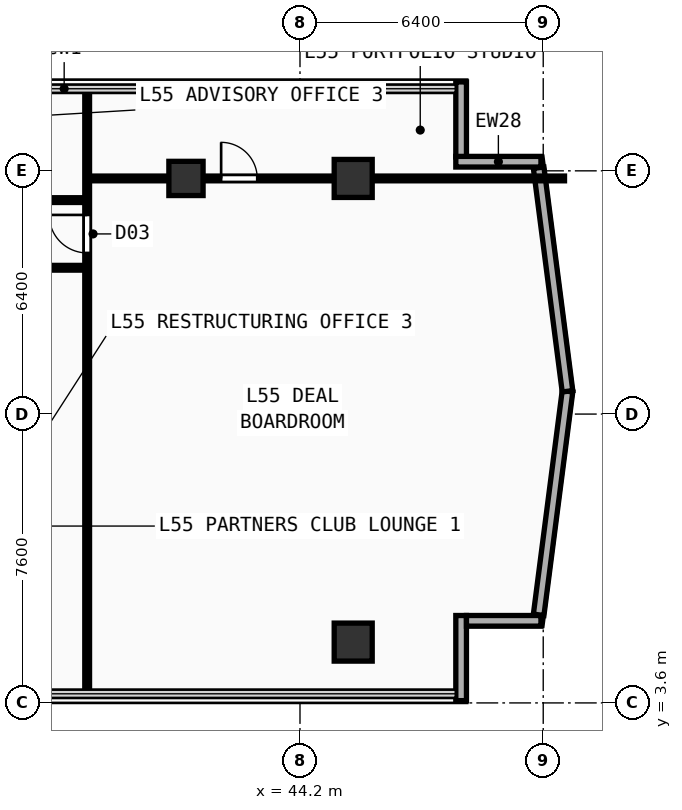
"""IFC4 building model, lengths in metres.
Left out: names, types, materials, properties, quantities, classifications, styles, units other than length and angle.
Written with IfcOpenShell. Run it as: python <this file> out.ifc"""

import sys

from ifc_helpers import new_model, si_unit, direction, frame, frame_2d, origin, origin_2d, place, context, subcontext, project, spatial, rectangle, extrude, element, fill, save


model = new_model("IFC4")
c1 = context("Model", 3, precision=1e-05, world=origin(), true_north=direction((0.0, 1.0)))
c2 = subcontext(c1, "Body", "Model", "MODEL_VIEW")
j1 = project(units=[si_unit("LENGTHUNIT", "METRE"), si_unit("PLANEANGLEUNIT", "RADIAN")], contexts=[c1])
p1 = place(None, origin())
s1 = spatial("IfcSite", under=j1, at=p1, CompositionType="ELEMENT")
p2 = place(p1, origin())
s2 = spatial("IfcBuilding", under=s1, at=p2, CompositionType="ELEMENT")
p3 = place(p2, frame((0.0, 0.0, 215.9)))
s3 = spatial("IfcBuildingStorey", under=s2, at=p3, CompositionType="ELEMENT", Elevation=215.9)
for number, where, z_axis, x_axis in (
    (1, (45.6, 5.2, 0.0), (0.0, 0.0, 1.0), (1.0, 0.0, 0.0)),
    (2, (45.6, 17.4, 0.0), (0.0, 0.0, 1.0), (1.0, 0.0, 0.0)),
):
    element("IfcColumn", number, at=place(p3, frame(where, z_axis=z_axis, x_axis=x_axis)), inside=s3, PredefinedType="COLUMN", context=c2, shape_type="SweptSolid", body=[
        extrude(rectangle(XDim=1.0, YDim=1.0, at=origin_2d()), origin(), (0.0, 0.0, 1.0), 3.56),
    ])
p4 = place(p3, frame((41.2, 17.4, 0.0), z_axis=(0.0, 0.0, 1.0), x_axis=(1.0, 0.0, 0.0)))
e3 = element("IfcColumn", 3, at=p4, inside=s3, PredefinedType="COLUMN", context=c2, shape_type="SweptSolid", body=[
    extrude(rectangle(XDim=0.9, YDim=0.9, at=origin_2d()), origin(), (0.0, 0.0, 1.0), 3.56),
])
p5 = place(p3, frame((48.44, 3.66, 0.0), z_axis=(0.0, 0.0, 1.0), x_axis=(0.0, 1.0, 0.0)))
e4 = element("IfcWall", 4, at=p5, inside=s3, PredefinedType="SOLIDWALL", context=c2, shape_type="SweptSolid", body=[
    extrude(rectangle(XDim=2.24, YDim=0.28, at=frame_2d((1.12, 0.0))), origin(), (0.0, 0.0, 1.0), 3.56),
])
p6 = place(p3, frame((48.58, 5.76, 0.0), z_axis=(0.0, 0.0, 1.0), x_axis=(1.0, 0.0, 0.0)))
e5 = element("IfcWall", 5, at=p6, inside=s3, PredefinedType="SOLIDWALL", context=c2, shape_type="SweptSolid", body=[
    extrude(rectangle(XDim=1.96, YDim=0.28, at=frame_2d((0.98, 0.0))), origin(), (0.0, 0.0, 1.0), 3.56),
])
p7 = place(p3, frame((48.44, 17.965, 0.0), z_axis=(0.0, 0.0, 1.0), x_axis=(0.0, 1.0, 0.0)))
e6 = element("IfcWall", 6, at=p7, inside=s3, PredefinedType="SOLIDWALL", context=c2, shape_type="SweptSolid", body=[
    extrude(rectangle(XDim=1.975, YDim=0.28, at=frame_2d((0.987, 0.0))), origin(), (0.0, 0.0, 1.0), 3.56),
])
p8 = place(p3, frame((48.3, 17.84, 0.0), z_axis=(0.0, 0.0, 1.0), x_axis=(1.0, 0.0, 0.0)))
e7 = element("IfcWall", 7, at=p8, inside=s3, PredefinedType="SOLIDWALL", context=c2, shape_type="SweptSolid", body=[
    extrude(rectangle(XDim=2.24, YDim=0.28, at=frame_2d((1.12, 0.0))), origin(), (0.0, 0.0, 1.0), 3.56),
])
for number, where, z_axis, x_axis in (
    (8, (50.48, 5.918, 0.0), (0.0, 0.0, 1.0), (0.128, 0.992, 0.0)),
    (9, (51.239, 11.799, 0.0), (0.0, 0.0, 1.0), (-0.128, 0.992, 0.0)),
):
    element("IfcWall", number, at=place(p3, frame(where, z_axis=z_axis, x_axis=x_axis)), inside=s3, PredefinedType="SOLIDWALL", context=c2, shape_type="SweptSolid", body=[
        extrude(rectangle(XDim=5.931, YDim=0.28, at=frame_2d((2.966, 0.0))), origin(), (0.0, 0.0, 1.0), 3.56),
    ])
p9 = place(p3, frame((23.7, 15.05, 0.0), z_axis=(0.0, 0.0, 1.0), x_axis=(1.0, 0.0, 0.0)))
e10 = element("IfcWall", 10, at=p9, inside=s3, PredefinedType="PARTITIONING", context=c2, shape_type="SweptSolid", body=[
    extrude(rectangle(XDim=14.9, YDim=0.125, at=frame_2d((7.45, 0.0))), origin(), (0.0, 0.0, 1.0), 3.56),
])
p10 = place(p9, frame((1.985, 0.0, 0.0)))
e11 = element("IfcOpeningElement", 11, at=p10, cuts=e10, PredefinedType="OPENING", context=c2, shape_type="SweptSolid", body=[
    extrude(rectangle(XDim=0.95, YDim=2.15, at=frame_2d((0.475, 1.075))), frame((0.0, 0.073, 0.0), z_axis=(0.0, -1.0, 0.0), x_axis=(1.0, 0.0, 0.0)), (0.0, 0.0, 1.0), 0.145),
])
p11 = place(p9, frame((6.903, 0.0, 0.0)))
e12 = element("IfcOpeningElement", 12, at=p11, cuts=e10, PredefinedType="OPENING", context=c2, shape_type="SweptSolid", body=[
    extrude(rectangle(XDim=0.95, YDim=2.15, at=frame_2d((0.475, 1.075))), frame((0.0, 0.073, 0.0), z_axis=(0.0, -1.0, 0.0), x_axis=(1.0, 0.0, 0.0)), (0.0, 0.0, 1.0), 0.145),
])
p12 = place(p9, frame((11.416, 0.0, 0.0)))
e13 = element("IfcOpeningElement", 13, at=p12, cuts=e10, PredefinedType="OPENING", context=c2, shape_type="SweptSolid", body=[
    extrude(rectangle(XDim=0.95, YDim=2.15, at=frame_2d((0.475, 1.075))), frame((0.0, 0.073, 0.0), z_axis=(0.0, -1.0, 0.0), x_axis=(1.0, 0.0, 0.0)), (0.0, 0.0, 1.0), 0.145),
])
p13 = place(p3, frame((38.6, 3.84, 0.0), z_axis=(0.0, 0.0, 1.0), x_axis=(0.0, 1.0, 0.0)))
e14 = element("IfcWall", 14, at=p13, inside=s3, PredefinedType="PARTITIONING", context=c2, shape_type="SweptSolid", body=[
    extrude(rectangle(XDim=15.92, YDim=0.125, at=frame_2d((7.96, 0.0))), origin(), (0.0, 0.0, 1.0), 3.56),
])
p14 = place(p13, frame((11.6, 0.0, 0.0)))
e15 = element("IfcOpeningElement", 15, at=p14, cuts=e14, PredefinedType="OPENING", context=c2, shape_type="SweptSolid", body=[
    extrude(rectangle(XDim=1.0, YDim=2.2, at=frame_2d((0.5, 1.1))), frame((0.0, 0.073, 0.0), z_axis=(0.0, -1.0, 0.0), x_axis=(1.0, 0.0, 0.0)), (0.0, 0.0, 1.0), 0.145),
])
p15 = place(p3, frame((38.6, 17.4, 0.0), z_axis=(0.0, 0.0, 1.0), x_axis=(1.0, 0.0, 0.0)))
e16 = element("IfcWall", 16, at=p15, inside=s3, PredefinedType="PARTITIONING", context=c2, shape_type="SweptSolid", body=[
    extrude(rectangle(XDim=12.56, YDim=0.125, at=frame_2d((6.28, 0.0))), origin(), (0.0, 0.0, 1.0), 3.26),
])
p16 = place(p15, frame((3.525, 0.0, 0.0)))
e17 = element("IfcOpeningElement", 17, at=p16, cuts=e16, PredefinedType="OPENING", context=c2, shape_type="SweptSolid", body=[
    extrude(rectangle(XDim=0.95, YDim=2.15, at=frame_2d((0.475, 1.075))), frame((0.0, 0.073, 0.0), z_axis=(0.0, -1.0, 0.0), x_axis=(1.0, 0.0, 0.0)), (0.0, 0.0, 1.0), 0.145),
])
p17 = place(p3, frame((23.65, 16.83, 0.0), z_axis=(0.0, 0.0, 1.0), x_axis=(1.0, 0.0, 0.0)))
e18 = element("IfcWall", 18, at=p17, inside=s3, PredefinedType="PARTITIONING", context=c2, shape_type="SweptSolid", body=[
    extrude(rectangle(XDim=14.95, YDim=0.125, at=frame_2d((7.475, 0.0))), origin(), (0.0, 0.0, 1.0), 3.56),
])
p18 = place(p17, frame((1.548, 0.0, 0.0)))
e19 = element("IfcOpeningElement", 19, at=p18, cuts=e18, PredefinedType="OPENING", context=c2, shape_type="SweptSolid", body=[
    extrude(rectangle(XDim=0.95, YDim=2.15, at=frame_2d((0.475, 1.075))), frame((0.0, 0.073, 0.0), z_axis=(0.0, -1.0, 0.0), x_axis=(1.0, 0.0, 0.0)), (0.0, 0.0, 1.0), 0.145),
])
p19 = place(p17, frame((6.333, 0.0, 0.0)))
e20 = element("IfcOpeningElement", 20, at=p19, cuts=e18, PredefinedType="OPENING", context=c2, shape_type="SweptSolid", body=[
    extrude(rectangle(XDim=0.95, YDim=2.15, at=frame_2d((0.475, 1.075))), frame((0.0, 0.073, 0.0), z_axis=(0.0, -1.0, 0.0), x_axis=(1.0, 0.0, 0.0)), (0.0, 0.0, 1.0), 0.145),
])
p20 = place(p17, frame((11.277, 0.0, 0.0)))
e21 = element("IfcOpeningElement", 21, at=p20, cuts=e18, PredefinedType="OPENING", context=c2, shape_type="SweptSolid", body=[
    extrude(rectangle(XDim=0.95, YDim=2.15, at=frame_2d((0.475, 1.075))), frame((0.0, 0.073, 0.0), z_axis=(0.0, -1.0, 0.0), x_axis=(1.0, 0.0, 0.0)), (0.0, 0.0, 1.0), 0.145),
])
p21 = place(p14, origin())
e22 = element("IfcDoor", 22, at=p21, inside=s3, OperationType="SINGLE_SWING_RIGHT", PredefinedType="DOOR", context=c2, shape_type="SweptSolid", body=[
    extrude(rectangle(XDim=1.0, YDim=2.2, at=frame_2d((0.5, 1.1))), frame((0.0, 0.025, 0.0), z_axis=(0.0, -1.0, 0.0), x_axis=(1.0, 0.0, 0.0)), (0.0, 0.0, 1.0), 0.05),
])
fill(e15, e22)
p22 = place(p16, origin())
e23 = element("IfcDoor", 23, at=p22, inside=s3, OperationType="SINGLE_SWING_LEFT", PredefinedType="DOOR", context=c2, shape_type="SweptSolid", body=[
    extrude(rectangle(XDim=0.95, YDim=2.15, at=frame_2d((0.475, 1.075))), frame((0.0, 0.025, 0.0), z_axis=(0.0, -1.0, 0.0), x_axis=(1.0, 0.0, 0.0)), (0.0, 0.0, 1.0), 0.05),
])
fill(e17, e23)
save(model, sys.argv[1])
